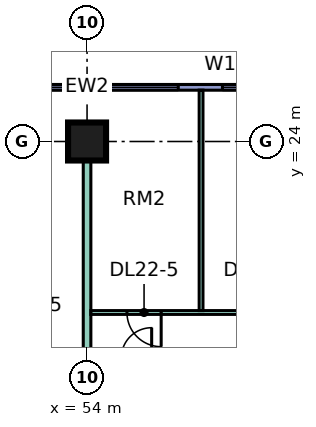
"""IFC4 building model, lengths in metres.
Left out: names, types, materials, properties, quantities, classifications, styles, units other than length and angle.
Written with IfcOpenShell. Run it as: python <this file> out.ifc"""

import sys

from ifc_helpers import new_model, si_unit, direction, frame, frame_2d, origin, origin_2d, place, context, subcontext, project, spatial, rectangle, extrude, element, fill, save


model = new_model("IFC4")
c1 = context("Model", 3, precision=1e-05, world=origin(), true_north=direction((0.0, 1.0)))
c2 = subcontext(c1, "Body", "Model", "MODEL_VIEW")
j1 = project(units=[si_unit("LENGTHUNIT", "METRE"), si_unit("PLANEANGLEUNIT", "RADIAN")], contexts=[c1])
p1 = place(None, origin())
s1 = spatial("IfcSite", under=j1, at=p1, CompositionType="ELEMENT")
p2 = place(p1, origin())
s2 = spatial("IfcBuilding", under=s1, at=p2, CompositionType="ELEMENT")
p3 = place(p2, frame((0.0, 0.0, 99.4)))
s3 = spatial("IfcBuildingStorey", under=s2, at=p3, CompositionType="ELEMENT", Elevation=99.4)
p4 = place(p3, frame((54.0, 24.0, 0.0), z_axis=(0.0, 0.0, 1.0), x_axis=(1.0, 0.0, 0.0)))
e1 = element("IfcColumn", 1, at=p4, inside=s3, PredefinedType="COLUMN", context=c2, shape_type="SweptSolid", body=[
    extrude(rectangle(XDim=1.0, YDim=1.0, at=origin_2d()), origin(), (0.0, 0.0, 1.0), 3.75),
])
p5 = place(p3, frame((59.925, 25.425, 0.0), z_axis=(0.0, 0.0, 1.0), x_axis=(-1.0, 0.0, 0.0)))
e2 = element("IfcWall", 2, at=p5, inside=s3, PredefinedType="SOLIDWALL", context=c2, shape_type="SweptSolid", body=[
    extrude(rectangle(XDim=11.85, YDim=0.15, at=frame_2d((5.925, 0.0))), origin(), (0.0, 0.0, 1.0), 3.35),
])
p6 = place(p5, frame((0.562, 0.0, 0.45)))
e3 = element("IfcOpeningElement", 3, at=p6, cuts=e2, PredefinedType="OPENING", context=c2, shape_type="SweptSolid", body=[
    extrude(rectangle(XDim=1.8, YDim=2.4, at=frame_2d((0.9, 1.2))), frame((0.0, 0.085, 0.0), z_axis=(0.0, -1.0, 0.0), x_axis=(1.0, 0.0, 0.0)), (0.0, 0.0, 1.0), 0.17),
])
p7 = place(p5, frame((3.525, 0.0, 0.45)))
e4 = element("IfcOpeningElement", 4, at=p7, cuts=e2, PredefinedType="OPENING", context=c2, shape_type="SweptSolid", body=[
    extrude(rectangle(XDim=1.8, YDim=2.4, at=frame_2d((0.9, 1.2))), frame((0.0, 0.085, 0.0), z_axis=(0.0, -1.0, 0.0), x_axis=(1.0, 0.0, 0.0)), (0.0, 0.0, 1.0), 0.17),
])
p8 = place(p5, frame((6.488, 0.0, 0.45)))
e5 = element("IfcOpeningElement", 5, at=p8, cuts=e2, PredefinedType="OPENING", context=c2, shape_type="SweptSolid", body=[
    extrude(rectangle(XDim=4.8, YDim=2.4, at=frame_2d((2.4, 1.2))), frame((0.0, 0.085, 0.0), z_axis=(0.0, -1.0, 0.0), x_axis=(1.0, 0.0, 0.0)), (0.0, 0.0, 1.0), 0.17),
])
p9 = place(p3, frame((54.0, 18.3, 0.0), z_axis=(0.0, 0.0, 1.0), x_axis=(0.0, 1.0, 0.0)))
e6 = element("IfcWall", 6, at=p9, inside=s3, PredefinedType="PARTITIONING", context=c2, shape_type="SweptSolid", body=[
    extrude(rectangle(XDim=5.7, YDim=0.2, at=frame_2d((2.85, 0.0))), origin(), (0.0, 0.0, 1.0), 3.35),
])
p10 = place(p3, frame((54.1, 19.5, 0.0), z_axis=(0.0, 0.0, 1.0), x_axis=(1.0, 0.0, 0.0)))
e7 = element("IfcWall", 7, at=p10, inside=s3, PredefinedType="PARTITIONING", context=c2, shape_type="SweptSolid", body=[
    extrude(rectangle(XDim=5.95, YDim=0.1, at=frame_2d((2.975, 0.0))), origin(), (0.0, 0.0, 1.0), 3.35),
])
p11 = place(p10, frame((0.95, 0.0, 0.0)))
e8 = element("IfcOpeningElement", 8, at=p11, cuts=e7, PredefinedType="OPENING", context=c2, shape_type="SweptSolid", body=[
    extrude(rectangle(XDim=0.9, YDim=2.1, at=frame_2d((0.45, 1.05))), frame((0.0, 0.06, 0.0), z_axis=(0.0, -1.0, 0.0), x_axis=(1.0, 0.0, 0.0)), (0.0, 0.0, 1.0), 0.12),
])
p12 = place(p10, frame((3.95, 0.0, 0.0)))
e9 = element("IfcOpeningElement", 9, at=p12, cuts=e7, PredefinedType="OPENING", context=c2, shape_type="SweptSolid", body=[
    extrude(rectangle(XDim=0.9, YDim=2.1, at=frame_2d((0.45, 1.05))), frame((0.0, 0.06, 0.0), z_axis=(0.0, -1.0, 0.0), x_axis=(1.0, 0.0, 0.0)), (0.0, 0.0, 1.0), 0.12),
])
p13 = place(p3, frame((57.0, 19.55, 0.0), z_axis=(0.0, 0.0, 1.0), x_axis=(0.0, 1.0, 0.0)))
e10 = element("IfcWall", 10, at=p13, inside=s3, PredefinedType="PARTITIONING", context=c2, shape_type="SweptSolid", body=[
    extrude(rectangle(XDim=5.801, YDim=0.1, at=frame_2d((2.9, 0.0))), origin(), (0.0, 0.0, 1.0), 3.35),
])
p14 = place(p6, origin())
e11 = element("IfcWindow", 11, at=p14, inside=s3, PartitioningType="SINGLE_PANEL", PredefinedType="WINDOW", context=c2, shape_type="SweptSolid", body=[
    extrude(rectangle(XDim=1.8, YDim=2.4, at=frame_2d((0.9, 1.2))), frame((0.0, 0.03, 0.0), z_axis=(0.0, -1.0, 0.0), x_axis=(1.0, 0.0, 0.0)), (0.0, 0.0, 1.0), 0.06),
])
fill(e3, e11)
p15 = place(p7, origin())
e12 = element("IfcWindow", 12, at=p15, inside=s3, PartitioningType="SINGLE_PANEL", PredefinedType="WINDOW", context=c2, shape_type="SweptSolid", body=[
    extrude(rectangle(XDim=1.8, YDim=2.4, at=frame_2d((0.9, 1.2))), frame((0.0, 0.03, 0.0), z_axis=(0.0, -1.0, 0.0), x_axis=(1.0, 0.0, 0.0)), (0.0, 0.0, 1.0), 0.06),
])
fill(e4, e12)
p16 = place(p8, origin())
e13 = element("IfcWindow", 13, at=p16, inside=s3, PartitioningType="SINGLE_PANEL", PredefinedType="WINDOW", context=c2, shape_type="SweptSolid", body=[
    extrude(rectangle(XDim=4.8, YDim=2.4, at=frame_2d((2.4, 1.2))), frame((0.0, 0.03, 0.0), z_axis=(0.0, -1.0, 0.0), x_axis=(1.0, 0.0, 0.0)), (0.0, 0.0, 1.0), 0.06),
])
fill(e5, e13)
p17 = place(p11, origin())
e14 = element("IfcDoor", 14, at=p17, inside=s3, OperationType="SINGLE_SWING_RIGHT", PredefinedType="DOOR", context=c2, shape_type="SweptSolid", body=[
    extrude(rectangle(XDim=0.9, YDim=2.1, at=frame_2d((0.45, 1.05))), frame((0.0, 0.025, 0.0), z_axis=(0.0, -1.0, 0.0), x_axis=(1.0, 0.0, 0.0)), (0.0, 0.0, 1.0), 0.05),
])
fill(e8, e14)
save(model, sys.argv[1])
